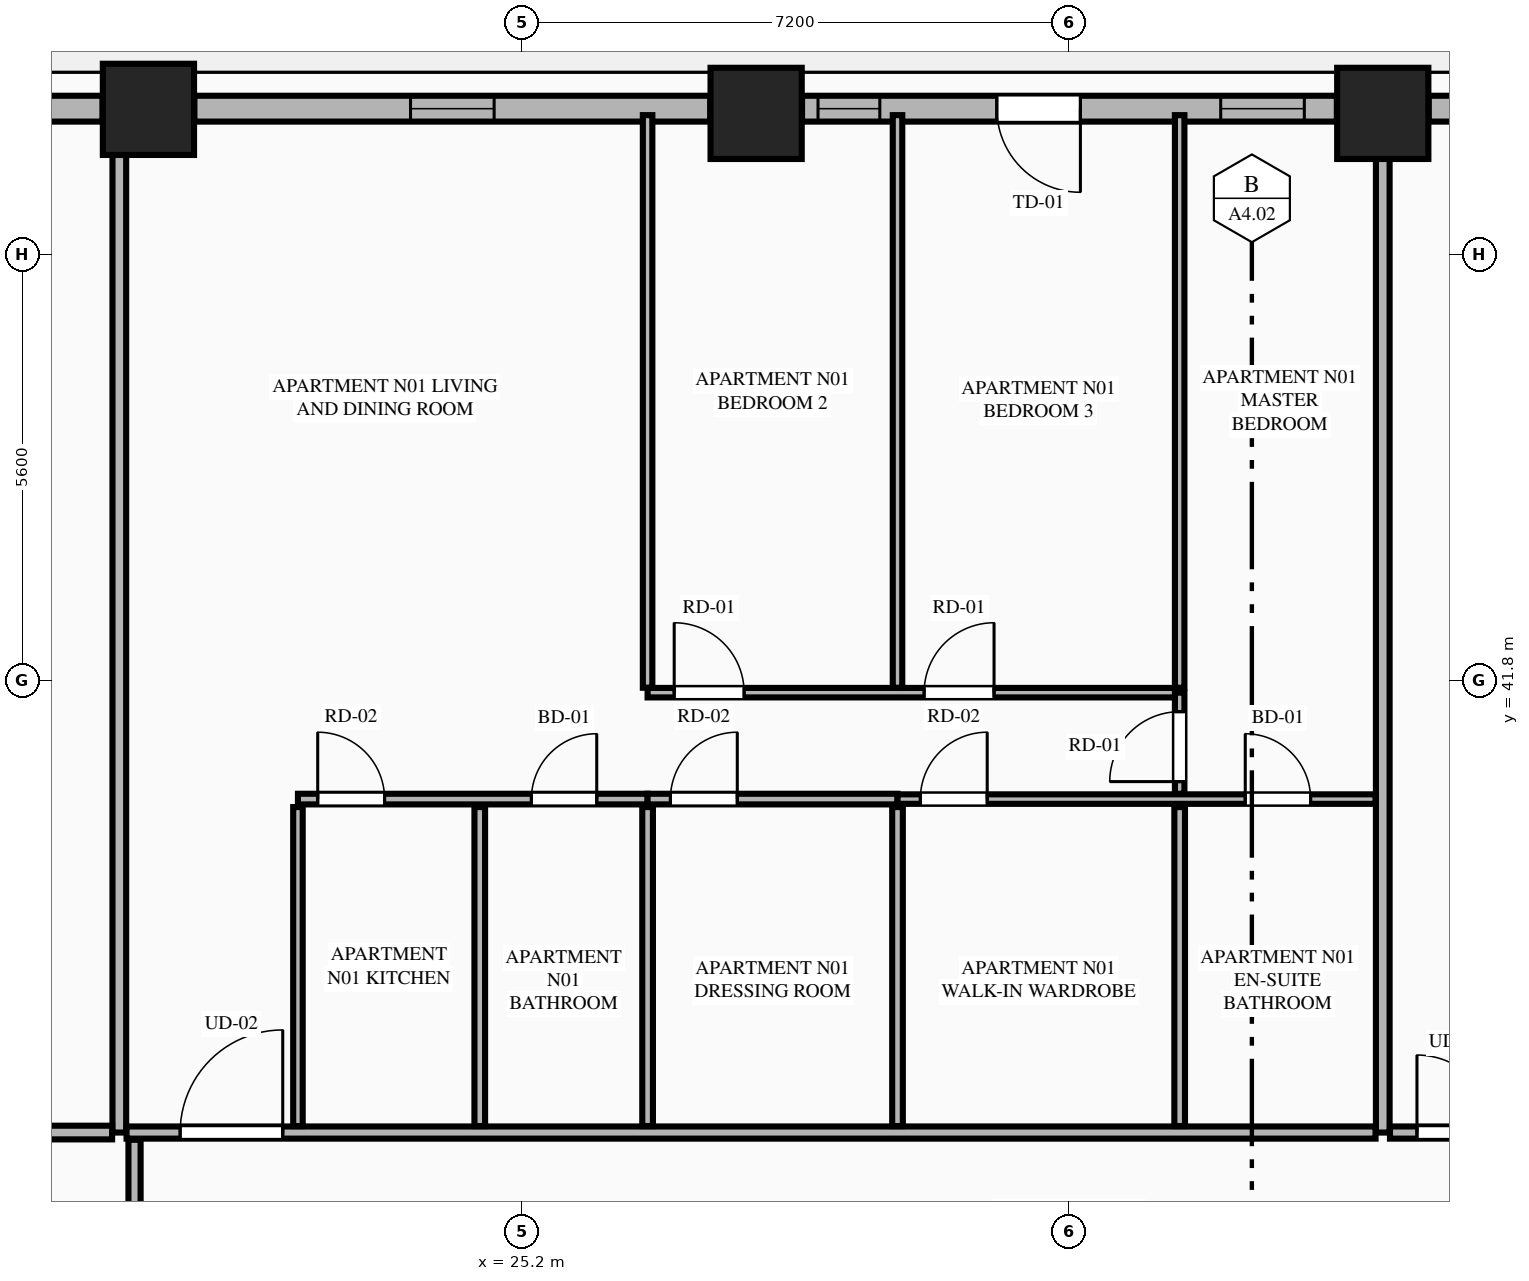
"""IFC4 building model, lengths in metres.
Left out: names, types, materials, properties, quantities, classifications, styles, units other than length and angle.
Written with IfcOpenShell. Run it as: python <this file> out.ifc"""

import sys

from ifc_helpers import new_model, si_unit, direction, frame, frame_2d, origin, origin_2d, place, context, subcontext, project, spatial, rectangle, extrude, element, fill, save


model = new_model("IFC4")
c1 = context("Model", 3, precision=1e-05, world=origin(), true_north=direction((0.0, 1.0)))
c2 = subcontext(c1, "Body", "Model", "MODEL_VIEW")
j1 = project(units=[si_unit("LENGTHUNIT", "METRE"), si_unit("PLANEANGLEUNIT", "RADIAN")], contexts=[c1])
p1 = place(None, origin())
s1 = spatial("IfcSite", under=j1, at=p1, CompositionType="ELEMENT")
p2 = place(p1, origin())
s2 = spatial("IfcBuilding", under=s1, at=p2, CompositionType="ELEMENT")
p3 = place(p2, frame((0.0, 0.0, 71.05)))
s3 = spatial("IfcBuildingStorey", under=s2, at=p3, CompositionType="ELEMENT", Elevation=71.05)
for number, where, z_axis, x_axis in (
    (1, (36.522, 49.258, 0.0), (0.0, 0.0, 1.0), (1.0, 0.0, 0.0)),
    (2, (28.278, 49.258, 0.0), (0.0, 0.0, 1.0), (1.0, 0.0, 0.0)),
    (3, (20.283, 49.311, 0.0), (0.0, 0.0, 1.0), (1.0, 0.0, 0.0)),
):
    element("IfcColumn", number, at=place(p3, frame(where, z_axis=z_axis, x_axis=x_axis)), inside=s3, PredefinedType="COLUMN", context=c2, shape_type="SweptSolid", body=[
        extrude(rectangle(XDim=1.2, YDim=1.2, at=origin_2d()), origin(), (0.0, 0.0, 1.0), 3.55),
    ])
p4 = place(p3, frame((43.913, 49.32, 0.0), z_axis=(0.0, 0.0, 1.0), x_axis=(-1.0, 0.0, 0.0)))
e4 = element("IfcWall", 4, at=p4, inside=s3, PredefinedType="STANDARD", context=c2, shape_type="SweptSolid", body=[
    extrude(rectangle(XDim=6.787, YDim=0.34, at=frame_2d((3.394, 0.0))), origin(), (0.0, 0.0, 1.0), 2.652),
])
p5 = place(p4, frame((2.843, 0.0, 0.75)))
e5 = element("IfcOpeningElement", 5, at=p5, cuts=e4, PredefinedType="OPENING", context=c2, shape_type="SweptSolid", body=[
    extrude(rectangle(XDim=1.1, YDim=1.752, at=frame_2d((0.55, 0.876))), frame((0.0, 0.18, 0.0), z_axis=(0.0, -1.0, 0.0), x_axis=(1.0, 0.0, 0.0)), (0.0, 0.0, 1.0), 0.36),
])
p6 = place(p3, frame((35.918, 49.32, 0.0), z_axis=(0.0, 0.0, 1.0), x_axis=(-1.0, 0.0, 0.0)))
e6 = element("IfcWall", 6, at=p6, inside=s3, PredefinedType="STANDARD", context=c2, shape_type="SweptSolid", body=[
    extrude(rectangle(XDim=7.036, YDim=0.34, at=frame_2d((3.518, 0.0))), origin(), (0.0, 0.0, 1.0), 2.652),
])
p7 = place(p6, frame((3.374, 0.0, 0.0)))
e7 = element("IfcOpeningElement", 7, at=p7, cuts=e6, PredefinedType="OPENING", context=c2, shape_type="SweptSolid", body=[
    extrude(rectangle(XDim=1.1, YDim=2.25, at=frame_2d((0.55, 1.125))), frame((0.0, 0.18, 0.0), z_axis=(0.0, -1.0, 0.0), x_axis=(1.0, 0.0, 0.0)), (0.0, 0.0, 1.0), 0.36),
])
p8 = place(p6, frame((0.428, 0.0, 0.75)))
e8 = element("IfcOpeningElement", 8, at=p8, cuts=e6, PredefinedType="OPENING", context=c2, shape_type="SweptSolid", body=[
    extrude(rectangle(XDim=1.1, YDim=1.752, at=frame_2d((0.55, 0.876))), frame((0.0, 0.18, 0.0), z_axis=(0.0, -1.0, 0.0), x_axis=(1.0, 0.0, 0.0)), (0.0, 0.0, 1.0), 0.36),
])
p9 = place(p6, frame((6.013, 0.0, 0.75)))
e9 = element("IfcOpeningElement", 9, at=p9, cuts=e6, PredefinedType="OPENING", context=c2, shape_type="SweptSolid", body=[
    extrude(rectangle(XDim=0.813, YDim=1.752, at=frame_2d((0.406, 0.876))), frame((0.0, 0.18, 0.0), z_axis=(0.0, -1.0, 0.0), x_axis=(1.0, 0.0, 0.0)), (0.0, 0.0, 1.0), 0.36),
])
p10 = place(p3, frame((27.674, 49.32, 0.0), z_axis=(0.0, 0.0, 1.0), x_axis=(-1.0, 0.0, 0.0)))
e10 = element("IfcWall", 10, at=p10, inside=s3, PredefinedType="STANDARD", context=c2, shape_type="SweptSolid", body=[
    extrude(rectangle(XDim=6.787, YDim=0.34, at=frame_2d((3.394, 0.0))), origin(), (0.0, 0.0, 1.0), 2.652),
])
p11 = place(p10, frame((2.843, 0.0, 0.75)))
e11 = element("IfcOpeningElement", 11, at=p11, cuts=e10, PredefinedType="OPENING", context=c2, shape_type="SweptSolid", body=[
    extrude(rectangle(XDim=1.1, YDim=1.752, at=frame_2d((0.55, 0.876))), frame((0.0, 0.18, 0.0), z_axis=(0.0, -1.0, 0.0), x_axis=(1.0, 0.0, 0.0)), (0.0, 0.0, 1.0), 0.36),
])
p12 = place(p3, frame((19.679, 49.32, 0.0), z_axis=(0.0, 0.0, 1.0), x_axis=(-1.0, 0.0, 0.0)))
e12 = element("IfcWall", 12, at=p12, inside=s3, PredefinedType="STANDARD", context=c2, shape_type="SweptSolid", body=[
    extrude(rectangle(XDim=1.245, YDim=0.34, at=frame_2d((0.623, 0.0))), origin(), (0.0, 0.0, 1.0), 3.27),
])
p13 = place(p3, frame((19.9, 35.85, 0.0), z_axis=(0.0, 0.0, 1.0), x_axis=(0.0, 1.0, 0.0)))
e13 = element("IfcWall", 13, at=p13, inside=s3, PredefinedType="PARTITIONING", context=c2, shape_type="SweptSolid", body=[
    extrude(rectangle(XDim=13.295, YDim=0.18, at=frame_2d((6.647, 0.0))), origin(), (0.0, 0.0, 1.0), 3.27),
])
p14 = place(p3, frame((36.522, 35.85, 0.0), z_axis=(0.0, 0.0, 1.0), x_axis=(0.0, 1.0, 0.0)))
e14 = element("IfcWall", 14, at=p14, inside=s3, PredefinedType="PARTITIONING", context=c2, shape_type="SweptSolid", body=[
    extrude(rectangle(XDim=13.295, YDim=0.18, at=frame_2d((6.647, 0.0))), origin(), (0.0, 0.0, 1.0), 2.64),
])
p15 = place(p3, frame((19.995, 35.85, 0.0), z_axis=(0.0, 0.0, 1.0), x_axis=(1.0, 0.0, 0.0)))
e15 = element("IfcWall", 15, at=p15, inside=s3, PredefinedType="PARTITIONING", context=c2, shape_type="SweptSolid", body=[
    extrude(rectangle(XDim=16.432, YDim=0.16, at=frame_2d((8.216, 0.0))), origin(), (0.0, 0.0, 1.0), 3.27),
])
p16 = place(p15, frame((0.705, 0.0, 0.0)))
e16 = element("IfcOpeningElement", 16, at=p16, cuts=e15, PredefinedType="OPENING", context=c2, shape_type="SweptSolid", body=[
    extrude(rectangle(XDim=1.35, YDim=2.35, at=frame_2d((0.675, 1.175))), frame((0.0, 0.09, 0.0), z_axis=(0.0, -1.0, 0.0), x_axis=(1.0, 0.0, 0.0)), (0.0, 0.0, 1.0), 0.18),
])
p17 = place(p3, frame((22.25, 35.935, 0.0), z_axis=(0.0, 0.0, 1.0), x_axis=(0.0, 1.0, 0.0)))
e17 = element("IfcWall", 17, at=p17, inside=s3, PredefinedType="PARTITIONING", context=c2, shape_type="SweptSolid", body=[
    extrude(rectangle(XDim=4.197, YDim=0.125, at=frame_2d((2.099, 0.0))), origin(), (0.0, 0.0, 1.0), 2.64),
])
p18 = place(p3, frame((22.25, 40.237, 0.0), z_axis=(0.0, 0.0, 1.0), x_axis=(1.0, 0.0, 0.0)))
e18 = element("IfcWall", 18, at=p18, inside=s3, PredefinedType="PLUMBINGWALL", context=c2, shape_type="SweptSolid", body=[
    extrude(rectangle(XDim=4.6, YDim=0.14, at=frame_2d((2.3, 0.0))), origin(), (0.0, 0.0, 1.0), 3.27),
])
p19 = place(p18, frame((3.071, 0.0, 0.0)))
e19 = element("IfcOpeningElement", 19, at=p19, cuts=e18, PredefinedType="OPENING", context=c2, shape_type="SweptSolid", body=[
    extrude(rectangle(XDim=0.86, YDim=2.1, at=frame_2d((0.43, 1.05))), frame((0.0, 0.08, 0.0), z_axis=(0.0, -1.0, 0.0), x_axis=(1.0, 0.0, 0.0)), (0.0, 0.0, 1.0), 0.16),
])
p20 = place(p18, frame((0.26, 0.0, 0.0)))
e20 = element("IfcOpeningElement", 20, at=p20, cuts=e18, PredefinedType="OPENING", context=c2, shape_type="SweptSolid", body=[
    extrude(rectangle(XDim=0.88, YDim=2.15, at=frame_2d((0.44, 1.075))), frame((0.0, 0.08, 0.0), z_axis=(0.0, -1.0, 0.0), x_axis=(1.0, 0.0, 0.0)), (0.0, 0.0, 1.0), 0.16),
])
p21 = place(p3, frame((26.85, 40.237, 0.0), z_axis=(0.0, 0.0, 1.0), x_axis=(1.0, 0.0, 0.0)))
e21 = element("IfcWall", 21, at=p21, inside=s3, PredefinedType="PLUMBINGWALL", context=c2, shape_type="SweptSolid", body=[
    extrude(rectangle(XDim=3.288, YDim=0.14, at=frame_2d((1.644, 0.0))), origin(), (0.0, 0.0, 1.0), 3.27),
])
p22 = place(p21, frame((0.3, 0.0, 0.0)))
e22 = element("IfcOpeningElement", 22, at=p22, cuts=e21, PredefinedType="OPENING", context=c2, shape_type="SweptSolid", body=[
    extrude(rectangle(XDim=0.88, YDim=2.15, at=frame_2d((0.44, 1.075))), frame((0.0, 0.08, 0.0), z_axis=(0.0, -1.0, 0.0), x_axis=(1.0, 0.0, 0.0)), (0.0, 0.0, 1.0), 0.16),
])
p23 = place(p3, frame((30.138, 40.237, 0.0), z_axis=(0.0, 0.0, 1.0), x_axis=(1.0, 0.0, 0.0)))
e23 = element("IfcWall", 23, at=p23, inside=s3, PredefinedType="PARTITIONING", context=c2, shape_type="SweptSolid", body=[
    extrude(rectangle(XDim=6.289, YDim=0.125, at=frame_2d((3.145, 0.0))), origin(), (0.0, 0.0, 1.0), 3.27),
])
p24 = place(p23, frame((4.575, 0.0, 0.0)))
e24 = element("IfcOpeningElement", 24, at=p24, cuts=e23, PredefinedType="OPENING", context=c2, shape_type="SweptSolid", body=[
    extrude(rectangle(XDim=0.86, YDim=2.1, at=frame_2d((0.43, 1.05))), frame((0.0, 0.073, 0.0), z_axis=(0.0, -1.0, 0.0), x_axis=(1.0, 0.0, 0.0)), (0.0, 0.0, 1.0), 0.145),
])
p25 = place(p23, frame((0.3, 0.0, 0.0)))
e25 = element("IfcOpeningElement", 25, at=p25, cuts=e23, PredefinedType="OPENING", context=c2, shape_type="SweptSolid", body=[
    extrude(rectangle(XDim=0.88, YDim=2.15, at=frame_2d((0.44, 1.075))), frame((0.0, 0.073, 0.0), z_axis=(0.0, -1.0, 0.0), x_axis=(1.0, 0.0, 0.0)), (0.0, 0.0, 1.0), 0.145),
])
p26 = place(p3, frame((24.642, 35.935, 0.0), z_axis=(0.0, 0.0, 1.0), x_axis=(0.0, 1.0, 0.0)))
e26 = element("IfcWall", 26, at=p26, inside=s3, PredefinedType="PLUMBINGWALL", context=c2, shape_type="SweptSolid", body=[
    extrude(rectangle(XDim=4.197, YDim=0.14, at=frame_2d((2.099, 0.0))), origin(), (0.0, 0.0, 1.0), 3.27),
])
p27 = place(p3, frame((26.85, 41.702, 0.0), z_axis=(0.0, 0.0, 1.0), x_axis=(0.0, 1.0, 0.0)))
e27 = element("IfcWall", 27, at=p27, inside=s3, PredefinedType="PARTITIONING", context=c2, shape_type="SweptSolid", body=[
    extrude(rectangle(XDim=7.533, YDim=0.125, at=frame_2d((3.767, 0.0))), origin(), (0.0, 0.0, 1.0), 3.27),
])
p28 = place(p3, frame((26.85, 41.637, 0.0), z_axis=(0.0, 0.0, 1.0), x_axis=(1.0, 0.0, 0.0)))
e28 = element("IfcWall", 28, at=p28, inside=s3, PredefinedType="PARTITIONING", context=c2, shape_type="SweptSolid", body=[
    extrude(rectangle(XDim=7.0, YDim=0.125, at=frame_2d((3.5, 0.0))), origin(), (0.0, 0.0, 1.0), 3.27),
])
p29 = place(p28, frame((0.35, 0.0, 0.0)))
e29 = element("IfcOpeningElement", 29, at=p29, cuts=e28, PredefinedType="OPENING", context=c2, shape_type="SweptSolid", body=[
    extrude(rectangle(XDim=0.92, YDim=2.15, at=frame_2d((0.46, 1.075))), frame((0.0, 0.073, 0.0), z_axis=(0.0, -1.0, 0.0), x_axis=(1.0, 0.0, 0.0)), (0.0, 0.0, 1.0), 0.145),
])
p30 = place(p28, frame((3.638, 0.0, 0.0)))
e30 = element("IfcOpeningElement", 30, at=p30, cuts=e28, PredefinedType="OPENING", context=c2, shape_type="SweptSolid", body=[
    extrude(rectangle(XDim=0.92, YDim=2.15, at=frame_2d((0.46, 1.075))), frame((0.0, 0.073, 0.0), z_axis=(0.0, -1.0, 0.0), x_axis=(1.0, 0.0, 0.0)), (0.0, 0.0, 1.0), 0.145),
])
p31 = place(p3, frame((33.85, 40.307, 0.0), z_axis=(0.0, 0.0, 1.0), x_axis=(0.0, 1.0, 0.0)))
e31 = element("IfcWall", 31, at=p31, inside=s3, PredefinedType="PARTITIONING", context=c2, shape_type="SweptSolid", body=[
    extrude(rectangle(XDim=1.33, YDim=0.125, at=frame_2d((0.665, 0.0))), origin(), (0.0, 0.0, 1.0), 3.27),
])
p32 = place(p31, frame((0.16, 0.0, 0.0)))
e32 = element("IfcOpeningElement", 32, at=p32, cuts=e31, PredefinedType="OPENING", context=c2, shape_type="SweptSolid", body=[
    extrude(rectangle(XDim=0.92, YDim=2.15, at=frame_2d((0.46, 1.075))), frame((0.0, 0.073, 0.0), z_axis=(0.0, -1.0, 0.0), x_axis=(1.0, 0.0, 0.0)), (0.0, 0.0, 1.0), 0.145),
])
for number, where, z_axis, x_axis in (
    (33, (26.85, 35.935, 0.0), (0.0, 0.0, 1.0), (0.0, 1.0, 0.0)),
    (34, (30.138, 35.935, 0.0), (0.0, 0.0, 1.0), (0.0, 1.0, 0.0)),
):
    element("IfcWall", number, at=place(p3, frame(where, z_axis=z_axis, x_axis=x_axis)), inside=s3, PredefinedType="PLUMBINGWALL", context=c2, shape_type="SweptSolid", body=[
        extrude(rectangle(XDim=4.197, YDim=0.14, at=frame_2d((2.099, 0.0))), origin(), (0.0, 0.0, 1.0), 3.27),
    ])
for number, where, z_axis, x_axis in (
    (35, (30.138, 41.702, 0.0), (0.0, 0.0, 1.0), (0.0, 1.0, 0.0)),
    (36, (33.85, 41.702, 0.0), (0.0, 0.0, 1.0), (0.0, 1.0, 0.0)),
):
    element("IfcWall", number, at=place(p3, frame(where, z_axis=z_axis, x_axis=x_axis)), inside=s3, PredefinedType="PARTITIONING", context=c2, shape_type="SweptSolid", body=[
        extrude(rectangle(XDim=7.533, YDim=0.125, at=frame_2d((3.767, 0.0))), origin(), (0.0, 0.0, 1.0), 3.27),
    ])
p33 = place(p3, frame((33.85, 35.935, 0.0), z_axis=(0.0, 0.0, 1.0), x_axis=(0.0, 1.0, 0.0)))
e37 = element("IfcWall", 37, at=p33, inside=s3, PredefinedType="PLUMBINGWALL", context=c2, shape_type="SweptSolid", body=[
    extrude(rectangle(XDim=4.197, YDim=0.14, at=frame_2d((2.099, 0.0))), origin(), (0.0, 0.0, 1.0), 3.27),
])
p34 = place(p3, frame((36.617, 35.85, 0.0), z_axis=(0.0, 0.0, 1.0), x_axis=(1.0, 0.0, 0.0)))
e38 = element("IfcWall", 38, at=p34, inside=s3, PredefinedType="PARTITIONING", context=c2, shape_type="SweptSolid", body=[
    extrude(rectangle(XDim=8.188, YDim=0.16, at=frame_2d((4.094, 0.0))), origin(), (0.0, 0.0, 1.0), 3.27),
])
p35 = place(p34, frame((0.355, 0.0, 0.0)))
e39 = element("IfcOpeningElement", 39, at=p35, cuts=e38, PredefinedType="OPENING", context=c2, shape_type="SweptSolid", body=[
    extrude(rectangle(XDim=1.02, YDim=2.25, at=frame_2d((0.51, 1.125))), frame((0.0, 0.09, 0.0), z_axis=(0.0, -1.0, 0.0), x_axis=(1.0, 0.0, 0.0)), (0.0, 0.0, 1.0), 0.18),
])
p36 = place(p3, frame((10.665, 35.85, 0.0), z_axis=(0.0, 0.0, 1.0), x_axis=(1.0, 0.0, 0.0)))
e40 = element("IfcWall", 40, at=p36, inside=s3, PredefinedType="PARTITIONING", context=c2, shape_type="SweptSolid", body=[
    extrude(rectangle(XDim=9.14, YDim=0.18, at=frame_2d((4.57, 0.0))), origin(), (0.0, 0.0, 1.0), 3.27),
])
p37 = place(p3, frame((20.1, 29.378, 0.0), z_axis=(0.0, 0.0, 1.0), x_axis=(0.0, 1.0, 0.0)))
e41 = element("IfcWall", 41, at=p37, inside=s3, PredefinedType="PARTITIONING", context=c2, shape_type="SweptSolid", body=[
    extrude(rectangle(XDim=6.377, YDim=0.16, at=frame_2d((3.188, 0.0))), origin(), (0.0, 0.0, 1.0), 2.64),
])
p38 = place(p37, frame((0.4, 0.0, 0.0)))
e42 = element("IfcOpeningElement", 42, at=p38, cuts=e41, PredefinedType="OPENING", context=c2, shape_type="SweptSolid", body=[
    extrude(rectangle(XDim=1.02, YDim=2.25, at=frame_2d((0.51, 1.125))), frame((0.0, 0.09, 0.0), z_axis=(0.0, -1.0, 0.0), x_axis=(1.0, 0.0, 0.0)), (0.0, 0.0, 1.0), 0.18),
])
p39 = place(p7, origin())
e43 = element("IfcDoor", 43, at=p39, inside=s3, OperationType="SINGLE_SWING_LEFT", PredefinedType="DOOR", context=c2, shape_type="SweptSolid", body=[
    extrude(rectangle(XDim=1.1, YDim=2.25, at=frame_2d((0.55, 1.125))), frame((0.0, 0.025, 0.0), z_axis=(0.0, -1.0, 0.0), x_axis=(1.0, 0.0, 0.0)), (0.0, 0.0, 1.0), 0.05),
])
fill(e7, e43)
p40 = place(p11, origin())
e44 = element("IfcWindow", 44, at=p40, inside=s3, PartitioningType="SINGLE_PANEL", PredefinedType="WINDOW", context=c2, shape_type="SweptSolid", body=[
    extrude(rectangle(XDim=1.1, YDim=1.752, at=frame_2d((0.55, 0.876))), frame((0.0, 0.03, 0.0), z_axis=(0.0, -1.0, 0.0), x_axis=(1.0, 0.0, 0.0)), (0.0, 0.0, 1.0), 0.06),
])
fill(e11, e44)
p41 = place(p19, origin())
e45 = element("IfcDoor", 45, at=p41, inside=s3, OperationType="SINGLE_SWING_RIGHT", PredefinedType="DOOR", context=c2, shape_type="SweptSolid", body=[
    extrude(rectangle(XDim=0.86, YDim=2.1, at=frame_2d((0.43, 1.05))), frame((0.0, 0.025, 0.0), z_axis=(0.0, -1.0, 0.0), x_axis=(1.0, 0.0, 0.0)), (0.0, 0.0, 1.0), 0.05),
])
fill(e19, e45)
p42 = place(p24, origin())
e46 = element("IfcDoor", 46, at=p42, inside=s3, OperationType="SINGLE_SWING_LEFT", PredefinedType="DOOR", context=c2, shape_type="SweptSolid", body=[
    extrude(rectangle(XDim=0.86, YDim=2.1, at=frame_2d((0.43, 1.05))), frame((0.0, 0.025, 0.0), z_axis=(0.0, -1.0, 0.0), x_axis=(1.0, 0.0, 0.0)), (0.0, 0.0, 1.0), 0.05),
])
fill(e24, e46)
p43 = place(p16, origin())
e47 = element("IfcDoor", 47, at=p43, inside=s3, OperationType="SINGLE_SWING_RIGHT", PredefinedType="DOOR", context=c2, shape_type="SweptSolid", body=[
    extrude(rectangle(XDim=1.35, YDim=2.35, at=frame_2d((0.675, 1.175))), frame((0.0, 0.025, 0.0), z_axis=(0.0, -1.0, 0.0), x_axis=(1.0, 0.0, 0.0)), (0.0, 0.0, 1.0), 0.05),
])
fill(e16, e47)
p44 = place(p20, origin())
e48 = element("IfcDoor", 48, at=p44, inside=s3, OperationType="SINGLE_SWING_LEFT", PredefinedType="DOOR", context=c2, shape_type="SweptSolid", body=[
    extrude(rectangle(XDim=0.88, YDim=2.15, at=frame_2d((0.44, 1.075))), frame((0.0, 0.025, 0.0), z_axis=(0.0, -1.0, 0.0), x_axis=(1.0, 0.0, 0.0)), (0.0, 0.0, 1.0), 0.05),
])
fill(e20, e48)
p45 = place(p22, origin())
e49 = element("IfcDoor", 49, at=p45, inside=s3, OperationType="SINGLE_SWING_RIGHT", PredefinedType="DOOR", context=c2, shape_type="SweptSolid", body=[
    extrude(rectangle(XDim=0.88, YDim=2.15, at=frame_2d((0.44, 1.075))), frame((0.0, 0.025, 0.0), z_axis=(0.0, -1.0, 0.0), x_axis=(1.0, 0.0, 0.0)), (0.0, 0.0, 1.0), 0.05),
])
fill(e22, e49)
p46 = place(p29, origin())
e50 = element("IfcDoor", 50, at=p46, inside=s3, OperationType="SINGLE_SWING_LEFT", PredefinedType="DOOR", context=c2, shape_type="SweptSolid", body=[
    extrude(rectangle(XDim=0.92, YDim=2.15, at=frame_2d((0.46, 1.075))), frame((0.0, 0.025, 0.0), z_axis=(0.0, -1.0, 0.0), x_axis=(1.0, 0.0, 0.0)), (0.0, 0.0, 1.0), 0.05),
])
fill(e29, e50)
p47 = place(p30, origin())
e51 = element("IfcDoor", 51, at=p47, inside=s3, OperationType="SINGLE_SWING_RIGHT", PredefinedType="DOOR", context=c2, shape_type="SweptSolid", body=[
    extrude(rectangle(XDim=0.92, YDim=2.15, at=frame_2d((0.46, 1.075))), frame((0.0, 0.025, 0.0), z_axis=(0.0, -1.0, 0.0), x_axis=(1.0, 0.0, 0.0)), (0.0, 0.0, 1.0), 0.05),
])
fill(e30, e51)
p48 = place(p32, origin())
e52 = element("IfcDoor", 52, at=p48, inside=s3, OperationType="SINGLE_SWING_LEFT", PredefinedType="DOOR", context=c2, shape_type="SweptSolid", body=[
    extrude(rectangle(XDim=0.92, YDim=2.15, at=frame_2d((0.46, 1.075))), frame((0.0, 0.025, 0.0), z_axis=(0.0, -1.0, 0.0), x_axis=(1.0, 0.0, 0.0)), (0.0, 0.0, 1.0), 0.05),
])
fill(e32, e52)
p49 = place(p25, origin())
e53 = element("IfcDoor", 53, at=p49, inside=s3, OperationType="SINGLE_SWING_RIGHT", PredefinedType="DOOR", context=c2, shape_type="SweptSolid", body=[
    extrude(rectangle(XDim=0.88, YDim=2.15, at=frame_2d((0.44, 1.075))), frame((0.0, 0.025, 0.0), z_axis=(0.0, -1.0, 0.0), x_axis=(1.0, 0.0, 0.0)), (0.0, 0.0, 1.0), 0.05),
])
fill(e25, e53)
p50 = place(p35, origin())
e54 = element("IfcDoor", 54, at=p50, inside=s3, OperationType="SINGLE_SWING_LEFT", PredefinedType="DOOR", context=c2, shape_type="SweptSolid", body=[
    extrude(rectangle(XDim=1.02, YDim=2.25, at=frame_2d((0.51, 1.125))), frame((0.0, 0.025, 0.0), z_axis=(0.0, -1.0, 0.0), x_axis=(1.0, 0.0, 0.0)), (0.0, 0.0, 1.0), 0.05),
])
fill(e39, e54)
p51 = place(p8, origin())
e55 = element("IfcWindow", 55, at=p51, inside=s3, PartitioningType="SINGLE_PANEL", PredefinedType="WINDOW", context=c2, shape_type="SweptSolid", body=[
    extrude(rectangle(XDim=1.1, YDim=1.752, at=frame_2d((0.55, 0.876))), frame((0.0, 0.03, 0.0), z_axis=(0.0, -1.0, 0.0), x_axis=(1.0, 0.0, 0.0)), (0.0, 0.0, 1.0), 0.06),
])
fill(e8, e55)
p52 = place(p9, origin())
e56 = element("IfcWindow", 56, at=p52, inside=s3, PartitioningType="SINGLE_PANEL", PredefinedType="WINDOW", context=c2, shape_type="SweptSolid", body=[
    extrude(rectangle(XDim=0.813, YDim=1.752, at=frame_2d((0.406, 0.876))), frame((0.0, 0.03, 0.0), z_axis=(0.0, -1.0, 0.0), x_axis=(1.0, 0.0, 0.0)), (0.0, 0.0, 1.0), 0.06),
])
fill(e9, e56)
save(model, sys.argv[1])
